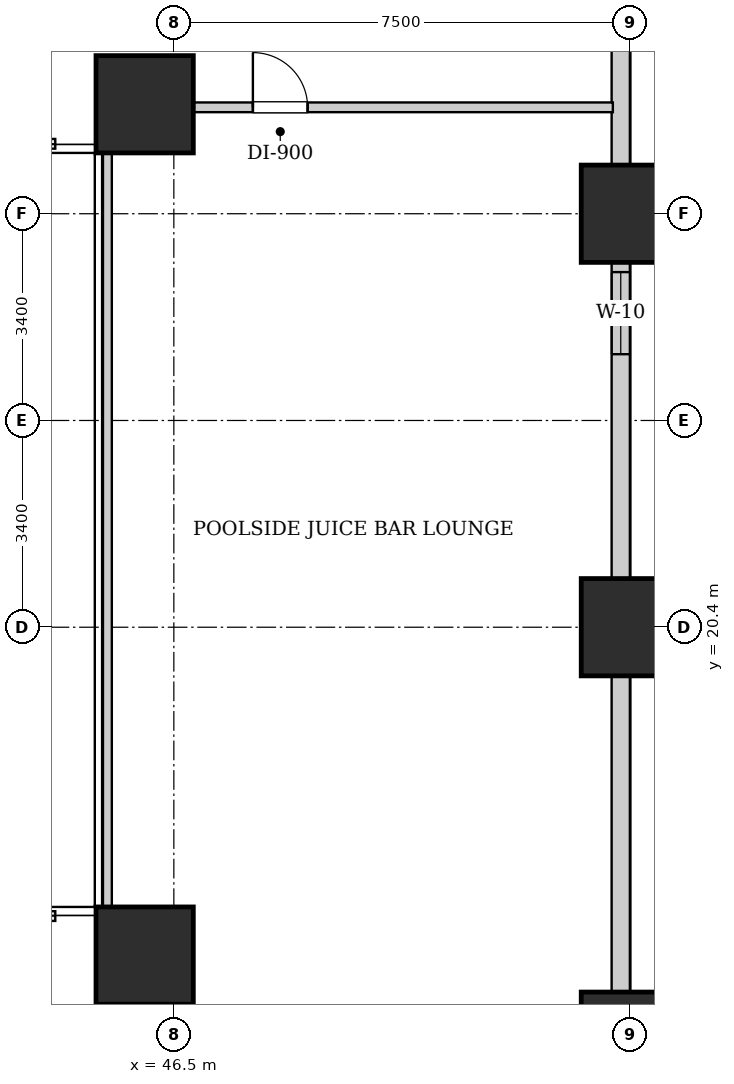
"""IFC4 building model, lengths in metres.
Left out: names, types, materials, properties, quantities, classifications, styles, units other than length and angle.
Written with IfcOpenShell. Run it as: python <this file> out.ifc"""

import sys

from ifc_helpers import new_model, si_unit, direction, frame, frame_2d, origin, origin_2d, place, context, subcontext, project, spatial, rectangle, extrude, element, fill, save


model = new_model("IFC4")
c1 = context("Model", 3, precision=1e-05, world=origin(), true_north=direction((0.0, 1.0)))
c2 = subcontext(c1, "Body", "Model", "MODEL_VIEW")
j1 = project(units=[si_unit("LENGTHUNIT", "METRE"), si_unit("PLANEANGLEUNIT", "RADIAN")], contexts=[c1])
p1 = place(None, origin())
s1 = spatial("IfcSite", under=j1, at=p1, CompositionType="ELEMENT")
p2 = place(p1, origin())
s2 = spatial("IfcBuilding", under=s1, at=p2, CompositionType="ELEMENT")
p3 = place(p2, frame((0.0, 0.0, 16.0)))
s3 = spatial("IfcBuildingStorey", under=s2, at=p3, CompositionType="ELEMENT", Elevation=16.0)
for number, where, z_axis, x_axis in (
    (1, (54.0, 13.6, 0.0), (0.0, 0.0, 1.0), (1.0, 0.0, 0.0)),
    (2, (54.0, 20.4, 0.0), (0.0, 0.0, 1.0), (1.0, 0.0, 0.0)),
    (3, (54.0, 27.2, 0.0), (0.0, 0.0, 1.0), (1.0, 0.0, 0.0)),
    (4, (46.02, 15.0, 0.0), (0.0, 0.0, 1.0), (1.0, 0.0, 0.0)),
    (5, (46.02, 29.0, 0.0), (0.0, 0.0, 1.0), (1.0, 0.0, 0.0)),
):
    element("IfcColumn", number, at=place(p3, frame(where, z_axis=z_axis, x_axis=x_axis)), inside=s3, PredefinedType="COLUMN", context=c2, shape_type="SweptSolid", body=[
        extrude(rectangle(XDim=1.6, YDim=1.6, at=origin_2d()), origin(), (0.0, 0.0, 1.0), 4.8),
    ])
p4 = place(p3, frame((53.85, 47.44, 0.0), z_axis=(0.0, 0.0, 1.0), x_axis=(0.0, -1.0, 0.0)))
e6 = element("IfcWall", 6, at=p4, inside=s3, PredefinedType="SOLIDWALL", context=c2, shape_type="SweptSolid", body=[
    extrude(rectangle(XDim=47.28, YDim=0.3, at=frame_2d((23.64, 0.0))), origin(), (0.0, 0.0, 1.0), 3.235),
])
p5 = place(p4, frame((3.33, 0.0, 0.9)))
e7 = element("IfcOpeningElement", 7, at=p5, cuts=e6, PredefinedType="OPENING", context=c2, shape_type="SweptSolid", body=[
    extrude(rectangle(XDim=2.7, YDim=2.1, at=frame_2d((1.35, 1.05))), frame((0.0, 0.16, 0.0), z_axis=(0.0, -1.0, 0.0), x_axis=(1.0, 0.0, 0.0)), (0.0, 0.0, 1.0), 0.32),
])
p6 = place(p4, frame((9.78, 0.0, 0.9)))
e8 = element("IfcOpeningElement", 8, at=p6, cuts=e6, PredefinedType="OPENING", context=c2, shape_type="SweptSolid", body=[
    extrude(rectangle(XDim=2.7, YDim=2.1, at=frame_2d((1.35, 1.05))), frame((0.0, 0.16, 0.0), z_axis=(0.0, -1.0, 0.0), x_axis=(1.0, 0.0, 0.0)), (0.0, 0.0, 1.0), 0.32),
])
p7 = place(p4, frame((21.2, 0.0, 0.55)))
e9 = element("IfcOpeningElement", 9, at=p7, cuts=e6, PredefinedType="OPENING", context=c2, shape_type="SweptSolid", body=[
    extrude(rectangle(XDim=1.35, YDim=1.2, at=frame_2d((0.675, 0.6))), frame((0.0, 0.16, 0.0), z_axis=(0.0, -1.0, 0.0), x_axis=(1.0, 0.0, 0.0)), (0.0, 0.0, 1.0), 0.32),
])
p8 = place(p4, frame((36.5, 0.0, 0.9)))
e10 = element("IfcOpeningElement", 10, at=p8, cuts=e6, PredefinedType="OPENING", context=c2, shape_type="SweptSolid", body=[
    extrude(rectangle(XDim=2.7, YDim=2.1, at=frame_2d((1.35, 1.05))), frame((0.0, 0.16, 0.0), z_axis=(0.0, -1.0, 0.0), x_axis=(1.0, 0.0, 0.0)), (0.0, 0.0, 1.0), 0.32),
])
p9 = place(p4, frame((43.0, 0.0, 0.9)))
e11 = element("IfcOpeningElement", 11, at=p9, cuts=e6, PredefinedType="OPENING", context=c2, shape_type="SweptSolid", body=[
    extrude(rectangle(XDim=2.7, YDim=2.1, at=frame_2d((1.35, 1.05))), frame((0.0, 0.16, 0.0), z_axis=(0.0, -1.0, 0.0), x_axis=(1.0, 0.0, 0.0)), (0.0, 0.0, 1.0), 0.32),
])
p10 = place(p3, frame((45.4, 28.95, 0.0), z_axis=(0.0, 0.0, 1.0), x_axis=(1.0, 0.0, 0.0)))
e12 = element("IfcWall", 12, at=p10, inside=s3, PredefinedType="PARTITIONING", context=c2, shape_type="SweptSolid", body=[
    extrude(rectangle(XDim=8.32, YDim=0.16, at=frame_2d((4.16, 0.0))), origin(), (0.0, 0.0, 1.0), 3.435),
])
p11 = place(p10, frame((2.4, 0.0, 0.0)))
e13 = element("IfcOpeningElement", 13, at=p11, cuts=e12, PredefinedType="OPENING", context=c2, shape_type="SweptSolid", body=[
    extrude(rectangle(XDim=0.9, YDim=2.05, at=frame_2d((0.45, 1.025))), frame((0.0, 0.09, 0.0), z_axis=(0.0, -1.0, 0.0), x_axis=(1.0, 0.0, 0.0)), (0.0, 0.0, 1.0), 0.18),
])
p12 = place(p3, frame((45.4, 15.1, 0.0), z_axis=(0.0, 0.0, 1.0), x_axis=(0.0, 1.0, 0.0)))
e14 = element("IfcWall", 14, at=p12, inside=s3, PredefinedType="PARTITIONING", context=c2, shape_type="SweptSolid", body=[
    extrude(rectangle(XDim=13.78, YDim=0.16, at=frame_2d((6.89, 0.0))), origin(), (0.0, 0.0, 1.0), 4.35),
])
p13 = place(p11, origin())
e15 = element("IfcDoor", 15, at=p13, inside=s3, OperationType="SINGLE_SWING_LEFT", PredefinedType="DOOR", context=c2, shape_type="SweptSolid", body=[
    extrude(rectangle(XDim=0.9, YDim=2.05, at=frame_2d((0.45, 1.025))), frame((0.0, 0.025, 0.0), z_axis=(0.0, -1.0, 0.0), x_axis=(1.0, 0.0, 0.0)), (0.0, 0.0, 1.0), 0.05),
])
fill(e13, e15)
p14 = place(p7, origin())
e16 = element("IfcWindow", 16, at=p14, inside=s3, PartitioningType="SINGLE_PANEL", PredefinedType="WINDOW", context=c2, shape_type="SweptSolid", body=[
    extrude(rectangle(XDim=1.35, YDim=1.2, at=frame_2d((0.675, 0.6))), frame((0.0, 0.03, 0.0), z_axis=(0.0, -1.0, 0.0), x_axis=(1.0, 0.0, 0.0)), (0.0, 0.0, 1.0), 0.06),
])
fill(e9, e16)
save(model, sys.argv[1])
